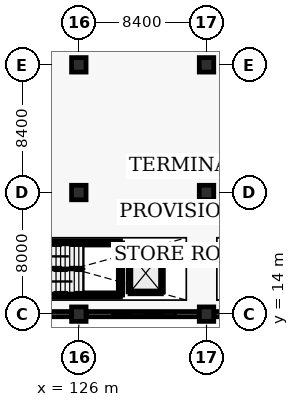
"""IFC4 building model, lengths in metres.
Left out: names, types, materials, properties, quantities, classifications, styles, units other than length and angle.
Written with IfcOpenShell. Run it as: python <this file> out.ifc"""

import sys

from ifc_helpers import new_model, si_unit, direction, frame, frame_2d, origin, origin_2d, place, context, subcontext, project, spatial, rectangle, extrude, element, fill, save


model = new_model("IFC4")
c1 = context("Model", 3, precision=1e-05, world=origin(), true_north=direction((0.0, 1.0)))
c2 = subcontext(c1, "Body", "Model", "MODEL_VIEW")
j1 = project(units=[si_unit("LENGTHUNIT", "METRE"), si_unit("PLANEANGLEUNIT", "RADIAN")], contexts=[c1])
p1 = place(None, origin())
s1 = spatial("IfcSite", under=j1, at=p1, CompositionType="ELEMENT")
p2 = place(p1, origin())
s2 = spatial("IfcBuilding", under=s1, at=p2, CompositionType="ELEMENT")
p3 = place(p2, origin())
s3 = spatial("IfcBuildingStorey", under=s2, at=p3, CompositionType="ELEMENT", Elevation=0.0)
for number, where, z_axis, x_axis in (
    (1, (126.0, 14.0, -0.46), (0.0, 0.0, 1.0), (1.0, 0.0, 0.0)),
    (2, (126.0, 22.0, -0.46), (0.0, 0.0, 1.0), (1.0, 0.0, 0.0)),
    (3, (126.0, 30.4, -0.46), (0.0, 0.0, 1.0), (1.0, 0.0, 0.0)),
    (4, (134.4, 14.0, -0.46), (0.0, 0.0, 1.0), (1.0, 0.0, 0.0)),
    (5, (134.4, 22.0, -0.46), (0.0, 0.0, 1.0), (1.0, 0.0, 0.0)),
    (6, (134.4, 30.4, -0.46), (0.0, 0.0, 1.0), (1.0, 0.0, 0.0)),
):
    element("IfcColumn", number, at=place(p3, frame(where, z_axis=z_axis, x_axis=x_axis)), inside=s3, PredefinedType="COLUMN", context=c2, shape_type="SweptSolid", body=[
        extrude(rectangle(XDim=0.95, YDim=0.95, at=origin_2d()), origin(), (0.0, 0.0, 1.0), 5.9),
    ])
p4 = place(p3, frame((118.075, 14.0, 0.0), z_axis=(0.0, 0.0, 1.0), x_axis=(1.0, 0.0, 0.0)))
e7 = element("IfcWall", 7, at=p4, inside=s3, PredefinedType="SOLIDWALL", context=c2, shape_type="SweptSolid", body=[
    extrude(rectangle(XDim=7.45, YDim=0.34, at=frame_2d((3.725, 0.0))), origin(), (0.0, 0.0, 1.0), 4.545),
])
p5 = place(p4, frame((1.715, 0.0, 0.0)))
e8 = element("IfcOpeningElement", 8, at=p5, cuts=e7, PredefinedType="OPENING", context=c2, shape_type="SweptSolid", body=[
    extrude(rectangle(XDim=4.2, YDim=4.3, at=frame_2d((2.1, 2.15))), frame((0.0, 0.18, 0.0), z_axis=(0.0, -1.0, 0.0), x_axis=(1.0, 0.0, 0.0)), (0.0, 0.0, 1.0), 0.36),
])
p6 = place(p3, frame((126.475, 14.0, 0.0), z_axis=(0.0, 0.0, 1.0), x_axis=(1.0, 0.0, 0.0)))
e9 = element("IfcWall", 9, at=p6, inside=s3, PredefinedType="SOLIDWALL", context=c2, shape_type="SweptSolid", body=[
    extrude(rectangle(XDim=7.45, YDim=0.34, at=frame_2d((3.725, 0.0))), origin(), (0.0, 0.0, 1.0), 4.545),
])
p7 = place(p6, frame((1.715, 0.0, 0.0)))
e10 = element("IfcOpeningElement", 10, at=p7, cuts=e9, PredefinedType="OPENING", context=c2, shape_type="SweptSolid", body=[
    extrude(rectangle(XDim=4.2, YDim=4.3, at=frame_2d((2.1, 2.15))), frame((0.0, 0.18, 0.0), z_axis=(0.0, -1.0, 0.0), x_axis=(1.0, 0.0, 0.0)), (0.0, 0.0, 1.0), 0.36),
])
p8 = place(p3, frame((134.875, 14.0, 0.0), z_axis=(0.0, 0.0, 1.0), x_axis=(1.0, 0.0, 0.0)))
e11 = element("IfcWall", 11, at=p8, inside=s3, PredefinedType="SOLIDWALL", context=c2, shape_type="SweptSolid", body=[
    extrude(rectangle(XDim=7.45, YDim=0.34, at=frame_2d((3.725, 0.0))), origin(), (0.0, 0.0, 1.0), 4.545),
])
p9 = place(p8, frame((1.665, 0.0, 0.0)))
e12 = element("IfcOpeningElement", 12, at=p9, cuts=e11, PredefinedType="OPENING", context=c2, shape_type="SweptSolid", body=[
    extrude(rectangle(XDim=1.85, YDim=2.2, at=frame_2d((0.925, 1.1))), frame((0.0, 0.18, 0.0), z_axis=(0.0, -1.0, 0.0), x_axis=(1.0, 0.0, 0.0)), (0.0, 0.0, 1.0), 0.36),
])
p10 = place(p8, frame((4.365, 0.0, 1.05)))
e13 = element("IfcOpeningElement", 13, at=p10, cuts=e11, PredefinedType="OPENING", context=c2, shape_type="SweptSolid", body=[
    extrude(rectangle(XDim=1.95, YDim=1.4, at=frame_2d((0.975, 0.7))), frame((0.0, 0.18, 0.0), z_axis=(0.0, -1.0, 0.0), x_axis=(1.0, 0.0, 0.0)), (0.0, 0.0, 1.0), 0.36),
])
for number, where, z_axis, x_axis in (
    (14, (119.86, 15.26, 0.0), (0.0, 0.0, 1.0), (1.0, 0.0, 0.0)),
    (15, (119.86, 18.69, 0.0), (0.0, 0.0, 1.0), (1.0, 0.0, 0.0)),
):
    element("IfcWall", number, at=place(p3, frame(where, z_axis=z_axis, x_axis=x_axis)), inside=s3, PredefinedType="SHEAR", context=c2, shape_type="SweptSolid", body=[
        extrude(rectangle(XDim=8.88, YDim=0.28, at=frame_2d((4.44, 0.0))), origin(), (0.0, 0.0, 1.0), 5.44),
    ])
p11 = place(p3, frame((128.74, 15.26, 0.0), z_axis=(0.0, 0.0, 1.0), x_axis=(0.0, 1.0, 0.0)))
e16 = element("IfcWall", 16, at=p11, inside=s3, PredefinedType="SHEAR", context=c2, shape_type="SweptSolid", body=[
    extrude(rectangle(XDim=3.43, YDim=0.28, at=frame_2d((1.715, 0.0))), origin(), (0.0, 0.0, 1.0), 5.44),
])
p12 = place(p3, frame((129.37, 15.47, 0.0), z_axis=(0.0, 0.0, 1.0), x_axis=(1.0, 0.0, 0.0)))
e17 = element("IfcWall", 17, at=p12, inside=s3, PredefinedType="SHEAR", context=c2, shape_type="SweptSolid", body=[
    extrude(rectangle(XDim=2.06, YDim=0.26, at=frame_2d((1.03, 0.0))), origin(), (0.0, 0.0, 1.0), 5.44),
])
for number, where, z_axis, x_axis in (
    (18, (131.43, 15.47, 0.0), (0.0, 0.0, 1.0), (0.0, 1.0, 0.0)),
    (19, (129.37, 17.93, 0.0), (0.0, 0.0, 1.0), (0.0, -1.0, 0.0)),
):
    element("IfcWall", number, at=place(p3, frame(where, z_axis=z_axis, x_axis=x_axis)), inside=s3, PredefinedType="SHEAR", context=c2, shape_type="SweptSolid", body=[
        extrude(rectangle(XDim=2.46, YDim=0.26, at=frame_2d((1.23, 0.0))), origin(), (0.0, 0.0, 1.0), 5.44),
    ])
p13 = place(p3, frame((129.37, 17.93, 0.0), z_axis=(0.0, 0.0, 1.0), x_axis=(1.0, 0.0, 0.0)))
e20 = element("IfcWall", 20, at=p13, inside=s3, PredefinedType="SHEAR", context=c2, shape_type="SweptSolid", body=[
    extrude(rectangle(XDim=2.06, YDim=0.26, at=frame_2d((1.03, 0.0))), origin(), (0.0, 0.0, 1.0), 5.44),
])
p14 = place(p13, frame((0.46, 0.0, 0.0)))
e21 = element("IfcOpeningElement", 21, at=p14, cuts=e20, PredefinedType="OPENING", context=c2, shape_type="SweptSolid", body=[
    extrude(rectangle(XDim=1.14, YDim=2.14, at=frame_2d((0.57, 1.07))), frame((0.0, 0.14, 0.0), z_axis=(0.0, -1.0, 0.0), x_axis=(1.0, 0.0, 0.0)), (0.0, 0.0, 1.0), 0.28),
])
p15 = place(p7, origin())
e22 = element("IfcDoor", 22, at=p15, inside=s3, OperationType="ROLLINGUP", PredefinedType="GATE", context=c2, shape_type="SweptSolid", body=[
    extrude(rectangle(XDim=4.2, YDim=4.3, at=frame_2d((2.1, 2.15))), frame((0.0, 0.025, 0.0), z_axis=(0.0, -1.0, 0.0), x_axis=(1.0, 0.0, 0.0)), (0.0, 0.0, 1.0), 0.05),
])
fill(e10, e22)
p16 = place(p14, origin())
e23 = element("IfcDoor", 23, at=p16, inside=s3, OperationType="DOUBLE_DOOR_SLIDING", PredefinedType="DOOR", context=c2, shape_type="SweptSolid", body=[
    extrude(rectangle(XDim=1.14, YDim=2.14, at=frame_2d((0.57, 1.07))), frame((0.0, 0.025, 0.0), z_axis=(0.0, -1.0, 0.0), x_axis=(1.0, 0.0, 0.0)), (0.0, 0.0, 1.0), 0.05),
])
fill(e21, e23)
save(model, sys.argv[1])
